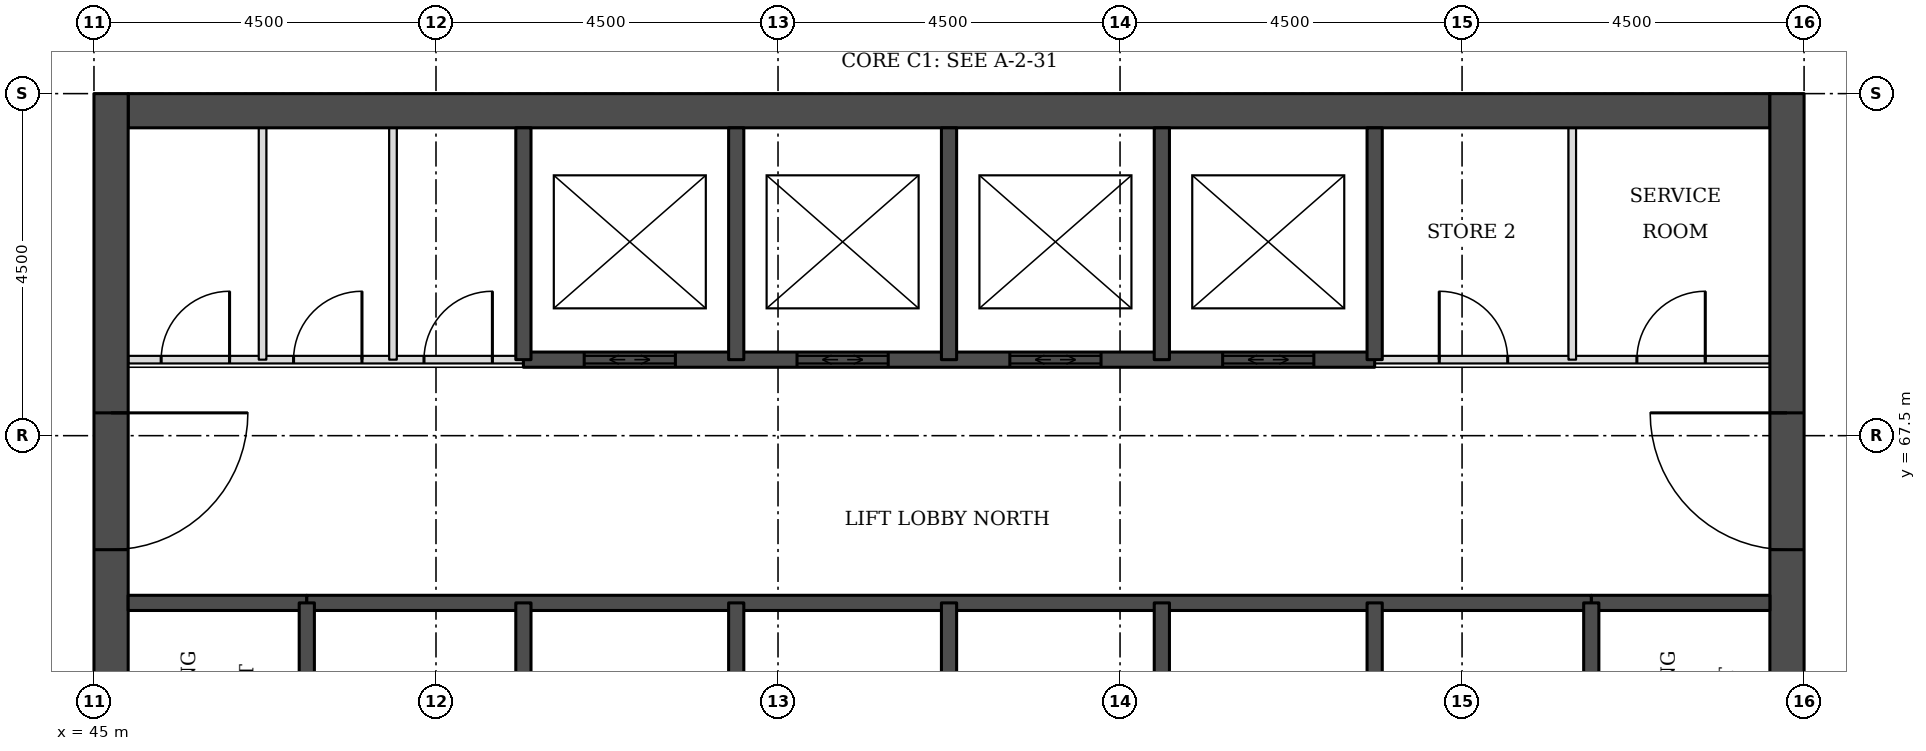
"""IFC4 building model, lengths in metres.
Left out: names, types, materials, properties, quantities, classifications, styles, units other than length and angle.
Written with IfcOpenShell. Run it as: python <this file> out.ifc"""

import sys

from ifc_helpers import new_model, si_unit, direction, frame, frame_2d, origin, place, context, subcontext, project, spatial, rectangle, extrude, element, fill, save


model = new_model("IFC4")
c1 = context("Model", 3, precision=1e-05, world=origin(), true_north=direction((0.0, 1.0)))
c2 = subcontext(c1, "Body", "Model", "MODEL_VIEW")
j1 = project(units=[si_unit("LENGTHUNIT", "METRE"), si_unit("PLANEANGLEUNIT", "RADIAN")], contexts=[c1])
p1 = place(None, origin())
s1 = spatial("IfcSite", under=j1, at=p1, CompositionType="ELEMENT")
p2 = place(p1, origin())
s2 = spatial("IfcBuilding", under=s1, at=p2, CompositionType="ELEMENT")
p3 = place(p2, frame((0.0, 0.0, 115.9)))
s3 = spatial("IfcBuildingStorey", under=s2, at=p3, CompositionType="ELEMENT", Elevation=115.9)
p4 = place(p3, frame((45.45, 71.775, 0.0), z_axis=(0.0, 0.0, 1.0), x_axis=(1.0, 0.0, 0.0)))
e1 = element("IfcWall", 1, at=p4, inside=s3, PredefinedType="SHEAR", context=c2, shape_type="SweptSolid", body=[
    extrude(rectangle(XDim=21.6, YDim=0.45, at=frame_2d((10.8, 0.0))), origin(), (0.0, 0.0, 1.0), 3.7),
])
p5 = place(p3, frame((45.225, 49.5, 0.0), z_axis=(0.0, 0.0, 1.0), x_axis=(0.0, 1.0, 0.0)))
e2 = element("IfcWall", 2, at=p5, inside=s3, PredefinedType="SHEAR", context=c2, shape_type="SweptSolid", body=[
    extrude(rectangle(XDim=22.5, YDim=0.45, at=frame_2d((11.25, 0.0))), origin(), (0.0, 0.0, 1.0), 3.7),
])
p6 = place(p5, frame((4.2, 0.0, 0.0)))
e3 = element("IfcOpeningElement", 3, at=p6, cuts=e2, PredefinedType="OPENING", context=c2, shape_type="SweptSolid", body=[
    extrude(rectangle(XDim=1.8, YDim=2.1, at=frame_2d((0.9, 1.05))), frame((0.0, 0.235, 0.0), z_axis=(0.0, -1.0, 0.0), x_axis=(1.0, 0.0, 0.0)), (0.0, 0.0, 1.0), 0.47),
])
p7 = place(p5, frame((6.9, 0.0, 0.0)))
e4 = element("IfcOpeningElement", 4, at=p7, cuts=e2, PredefinedType="OPENING", context=c2, shape_type="SweptSolid", body=[
    extrude(rectangle(XDim=1.1, YDim=2.1, at=frame_2d((0.55, 1.05))), frame((0.0, 0.235, 0.0), z_axis=(0.0, -1.0, 0.0), x_axis=(1.0, 0.0, 0.0)), (0.0, 0.0, 1.0), 0.47),
])
p8 = place(p5, frame((13.6, 0.0, 0.0)))
e5 = element("IfcOpeningElement", 5, at=p8, cuts=e2, PredefinedType="OPENING", context=c2, shape_type="SweptSolid", body=[
    extrude(rectangle(XDim=1.1, YDim=2.1, at=frame_2d((0.55, 1.05))), frame((0.0, 0.235, 0.0), z_axis=(0.0, -1.0, 0.0), x_axis=(1.0, 0.0, 0.0)), (0.0, 0.0, 1.0), 0.47),
])
p9 = place(p5, frame((16.5, 0.0, 0.0)))
e6 = element("IfcOpeningElement", 6, at=p9, cuts=e2, PredefinedType="OPENING", context=c2, shape_type="SweptSolid", body=[
    extrude(rectangle(XDim=1.8, YDim=2.1, at=frame_2d((0.9, 1.05))), frame((0.0, 0.235, 0.0), z_axis=(0.0, -1.0, 0.0), x_axis=(1.0, 0.0, 0.0)), (0.0, 0.0, 1.0), 0.47),
])
p10 = place(p3, frame((67.275, 49.5, 0.0), z_axis=(0.0, 0.0, 1.0), x_axis=(0.0, 1.0, 0.0)))
e7 = element("IfcWall", 7, at=p10, inside=s3, PredefinedType="SHEAR", context=c2, shape_type="SweptSolid", body=[
    extrude(rectangle(XDim=22.5, YDim=0.45, at=frame_2d((11.25, 0.0))), origin(), (0.0, 0.0, 1.0), 3.7),
])
p11 = place(p10, frame((4.2, 0.0, 0.0)))
e8 = element("IfcOpeningElement", 8, at=p11, cuts=e7, PredefinedType="OPENING", context=c2, shape_type="SweptSolid", body=[
    extrude(rectangle(XDim=1.8, YDim=2.1, at=frame_2d((0.9, 1.05))), frame((0.0, 0.235, 0.0), z_axis=(0.0, -1.0, 0.0), x_axis=(1.0, 0.0, 0.0)), (0.0, 0.0, 1.0), 0.47),
])
p12 = place(p10, frame((6.9, 0.0, 0.0)))
e9 = element("IfcOpeningElement", 9, at=p12, cuts=e7, PredefinedType="OPENING", context=c2, shape_type="SweptSolid", body=[
    extrude(rectangle(XDim=1.1, YDim=2.1, at=frame_2d((0.55, 1.05))), frame((0.0, 0.235, 0.0), z_axis=(0.0, -1.0, 0.0), x_axis=(1.0, 0.0, 0.0)), (0.0, 0.0, 1.0), 0.47),
])
p13 = place(p10, frame((13.6, 0.0, 0.0)))
e10 = element("IfcOpeningElement", 10, at=p13, cuts=e7, PredefinedType="OPENING", context=c2, shape_type="SweptSolid", body=[
    extrude(rectangle(XDim=1.1, YDim=2.1, at=frame_2d((0.55, 1.05))), frame((0.0, 0.235, 0.0), z_axis=(0.0, -1.0, 0.0), x_axis=(1.0, 0.0, 0.0)), (0.0, 0.0, 1.0), 0.47),
])
p14 = place(p10, frame((16.5, 0.0, 0.0)))
e11 = element("IfcOpeningElement", 11, at=p14, cuts=e7, PredefinedType="OPENING", context=c2, shape_type="SweptSolid", body=[
    extrude(rectangle(XDim=1.8, YDim=2.1, at=frame_2d((0.9, 1.05))), frame((0.0, 0.235, 0.0), z_axis=(0.0, -1.0, 0.0), x_axis=(1.0, 0.0, 0.0)), (0.0, 0.0, 1.0), 0.47),
])
for number, where, z_axis, x_axis in (
    (12, (45.45, 65.3, 0.0), (0.0, 0.0, 1.0), (1.0, 0.0, 0.0)),
    (13, (64.7, 65.3, 0.0), (0.0, 0.0, 1.0), (1.0, 0.0, 0.0)),
):
    element("IfcWall", number, at=place(p3, frame(where, z_axis=z_axis, x_axis=x_axis)), inside=s3, PredefinedType="SOLIDWALL", context=c2, shape_type="SweptSolid", body=[
        extrude(rectangle(XDim=2.35, YDim=0.2, at=frame_2d((1.175, 0.0))), origin(), (0.0, 0.0, 1.0), 3.55),
    ])
p15 = place(p3, frame((47.8, 65.3, 0.0), z_axis=(0.0, 0.0, 1.0), x_axis=(1.0, 0.0, 0.0)))
e14 = element("IfcWall", 14, at=p15, inside=s3, PredefinedType="SOLIDWALL", context=c2, shape_type="SweptSolid", body=[
    extrude(rectangle(XDim=16.9, YDim=0.2, at=frame_2d((8.45, 0.0))), origin(), (0.0, 0.0, 1.0), 3.55),
])
p16 = place(p3, frame((45.45, 68.5, 0.0), z_axis=(0.0, 0.0, 1.0), x_axis=(1.0, 0.0, 0.0)))
e15 = element("IfcWall", 15, at=p16, inside=s3, PredefinedType="PARTITIONING", context=c2, shape_type="SweptSolid", body=[
    extrude(rectangle(XDim=5.2, YDim=0.1, at=frame_2d((2.6, 0.0))), origin(), (0.0, 0.0, 1.0), 3.55),
])
p17 = place(p16, frame((0.434, 0.0, 0.0)))
e16 = element("IfcOpeningElement", 16, at=p17, cuts=e15, PredefinedType="OPENING", context=c2, shape_type="SweptSolid", body=[
    extrude(rectangle(XDim=0.9, YDim=2.1, at=frame_2d((0.45, 1.05))), frame((0.0, 0.06, 0.0), z_axis=(0.0, -1.0, 0.0), x_axis=(1.0, 0.0, 0.0)), (0.0, 0.0, 1.0), 0.12),
])
p18 = place(p16, frame((2.176, 0.0, 0.0)))
e17 = element("IfcOpeningElement", 17, at=p18, cuts=e15, PredefinedType="OPENING", context=c2, shape_type="SweptSolid", body=[
    extrude(rectangle(XDim=0.9, YDim=2.1, at=frame_2d((0.45, 1.05))), frame((0.0, 0.06, 0.0), z_axis=(0.0, -1.0, 0.0), x_axis=(1.0, 0.0, 0.0)), (0.0, 0.0, 1.0), 0.12),
])
p19 = place(p16, frame((3.892, 0.0, 0.0)))
e18 = element("IfcOpeningElement", 18, at=p19, cuts=e15, PredefinedType="OPENING", context=c2, shape_type="SweptSolid", body=[
    extrude(rectangle(XDim=0.9, YDim=2.1, at=frame_2d((0.45, 1.05))), frame((0.0, 0.06, 0.0), z_axis=(0.0, -1.0, 0.0), x_axis=(1.0, 0.0, 0.0)), (0.0, 0.0, 1.0), 0.12),
])
p20 = place(p3, frame((61.85, 68.5, 0.0), z_axis=(0.0, 0.0, 1.0), x_axis=(1.0, 0.0, 0.0)))
e19 = element("IfcWall", 19, at=p20, inside=s3, PredefinedType="PARTITIONING", context=c2, shape_type="SweptSolid", body=[
    extrude(rectangle(XDim=5.2, YDim=0.1, at=frame_2d((2.6, 0.0))), origin(), (0.0, 0.0, 1.0), 3.55),
])
p21 = place(p20, frame((3.45, 0.0, 0.0)))
e20 = element("IfcOpeningElement", 20, at=p21, cuts=e19, PredefinedType="OPENING", context=c2, shape_type="SweptSolid", body=[
    extrude(rectangle(XDim=0.9, YDim=2.1, at=frame_2d((0.45, 1.05))), frame((0.0, 0.06, 0.0), z_axis=(0.0, -1.0, 0.0), x_axis=(1.0, 0.0, 0.0)), (0.0, 0.0, 1.0), 0.12),
])
p22 = place(p20, frame((0.85, 0.0, 0.0)))
e21 = element("IfcOpeningElement", 21, at=p22, cuts=e19, PredefinedType="OPENING", context=c2, shape_type="SweptSolid", body=[
    extrude(rectangle(XDim=0.9, YDim=2.1, at=frame_2d((0.45, 1.05))), frame((0.0, 0.06, 0.0), z_axis=(0.0, -1.0, 0.0), x_axis=(1.0, 0.0, 0.0)), (0.0, 0.0, 1.0), 0.12),
])
p23 = place(p3, frame((50.65, 68.5, 0.0), z_axis=(0.0, 0.0, 1.0), x_axis=(1.0, 0.0, 0.0)))
e22 = element("IfcWall", 22, at=p23, inside=s3, PredefinedType="SOLIDWALL", context=c2, shape_type="SweptSolid", body=[
    extrude(rectangle(XDim=11.2, YDim=0.2, at=frame_2d((5.6, 0.0))), origin(), (0.0, 0.0, 1.0), 3.55),
])
p24 = place(p23, frame((0.8, 0.0, 0.0)))
e23 = element("IfcOpeningElement", 23, at=p24, cuts=e22, PredefinedType="OPENING", context=c2, shape_type="SweptSolid", body=[
    extrude(rectangle(XDim=1.2, YDim=2.1, at=frame_2d((0.6, 1.05))), frame((0.0, 0.11, 0.0), z_axis=(0.0, -1.0, 0.0), x_axis=(1.0, 0.0, 0.0)), (0.0, 0.0, 1.0), 0.22),
])
p25 = place(p23, frame((3.6, 0.0, 0.0)))
e24 = element("IfcOpeningElement", 24, at=p25, cuts=e22, PredefinedType="OPENING", context=c2, shape_type="SweptSolid", body=[
    extrude(rectangle(XDim=1.2, YDim=2.1, at=frame_2d((0.6, 1.05))), frame((0.0, 0.11, 0.0), z_axis=(0.0, -1.0, 0.0), x_axis=(1.0, 0.0, 0.0)), (0.0, 0.0, 1.0), 0.22),
])
p26 = place(p23, frame((6.4, 0.0, 0.0)))
e25 = element("IfcOpeningElement", 25, at=p26, cuts=e22, PredefinedType="OPENING", context=c2, shape_type="SweptSolid", body=[
    extrude(rectangle(XDim=1.2, YDim=2.1, at=frame_2d((0.6, 1.05))), frame((0.0, 0.11, 0.0), z_axis=(0.0, -1.0, 0.0), x_axis=(1.0, 0.0, 0.0)), (0.0, 0.0, 1.0), 0.22),
])
p27 = place(p23, frame((9.2, 0.0, 0.0)))
e26 = element("IfcOpeningElement", 26, at=p27, cuts=e22, PredefinedType="OPENING", context=c2, shape_type="SweptSolid", body=[
    extrude(rectangle(XDim=1.2, YDim=2.1, at=frame_2d((0.6, 1.05))), frame((0.0, 0.11, 0.0), z_axis=(0.0, -1.0, 0.0), x_axis=(1.0, 0.0, 0.0)), (0.0, 0.0, 1.0), 0.22),
])
p28 = place(p3, frame((47.218, 68.5, 0.0), z_axis=(0.0, 0.0, 1.0), x_axis=(0.0, 1.0, 0.0)))
e27 = element("IfcWall", 27, at=p28, inside=s3, PredefinedType="PARTITIONING", context=c2, shape_type="SweptSolid", body=[
    extrude(rectangle(XDim=3.05, YDim=0.1, at=frame_2d((1.525, 0.0))), origin(), (0.0, 0.0, 1.0), 3.55),
])
p29 = place(p3, frame((47.8, 62.0, 0.0), z_axis=(0.0, 0.0, 1.0), x_axis=(0.0, 1.0, 0.0)))
e28 = element("IfcWall", 28, at=p29, inside=s3, PredefinedType="SOLIDWALL", context=c2, shape_type="SweptSolid", body=[
    extrude(rectangle(XDim=3.3, YDim=0.2, at=frame_2d((1.65, 0.0))), origin(), (0.0, 0.0, 1.0), 3.55),
])
p30 = place(p29, frame((1.1, 0.0, 0.0)))
e29 = element("IfcOpeningElement", 29, at=p30, cuts=e28, PredefinedType="OPENING", context=c2, shape_type="SweptSolid", body=[
    extrude(rectangle(XDim=1.1, YDim=2.1, at=frame_2d((0.55, 1.05))), frame((0.0, 0.11, 0.0), z_axis=(0.0, -1.0, 0.0), x_axis=(1.0, 0.0, 0.0)), (0.0, 0.0, 1.0), 0.22),
])
p31 = place(p3, frame((48.934, 68.5, 0.0), z_axis=(0.0, 0.0, 1.0), x_axis=(0.0, 1.0, 0.0)))
e30 = element("IfcWall", 30, at=p31, inside=s3, PredefinedType="PARTITIONING", context=c2, shape_type="SweptSolid", body=[
    extrude(rectangle(XDim=3.05, YDim=0.1, at=frame_2d((1.525, 0.0))), origin(), (0.0, 0.0, 1.0), 3.55),
])
p32 = place(p3, frame((50.65, 62.0, 0.0), z_axis=(0.0, 0.0, 1.0), x_axis=(0.0, 1.0, 0.0)))
e31 = element("IfcWall", 31, at=p32, inside=s3, PredefinedType="SOLIDWALL", context=c2, shape_type="SweptSolid", body=[
    extrude(rectangle(XDim=3.3, YDim=0.2, at=frame_2d((1.65, 0.0))), origin(), (0.0, 0.0, 1.0), 3.55),
])
p33 = place(p3, frame((50.65, 68.5, 0.0), z_axis=(0.0, 0.0, 1.0), x_axis=(0.0, 1.0, 0.0)))
e32 = element("IfcWall", 32, at=p33, inside=s3, PredefinedType="SOLIDWALL", context=c2, shape_type="SweptSolid", body=[
    extrude(rectangle(XDim=3.05, YDim=0.2, at=frame_2d((1.525, 0.0))), origin(), (0.0, 0.0, 1.0), 3.55),
])
p34 = place(p3, frame((53.45, 62.5, 0.0), z_axis=(0.0, 0.0, 1.0), x_axis=(0.0, 1.0, 0.0)))
e33 = element("IfcWall", 33, at=p34, inside=s3, PredefinedType="SOLIDWALL", context=c2, shape_type="SweptSolid", body=[
    extrude(rectangle(XDim=2.8, YDim=0.2, at=frame_2d((1.4, 0.0))), origin(), (0.0, 0.0, 1.0), 3.55),
])
p35 = place(p3, frame((53.45, 68.5, 0.0), z_axis=(0.0, 0.0, 1.0), x_axis=(0.0, 1.0, 0.0)))
e34 = element("IfcWall", 34, at=p35, inside=s3, PredefinedType="SOLIDWALL", context=c2, shape_type="SweptSolid", body=[
    extrude(rectangle(XDim=3.05, YDim=0.2, at=frame_2d((1.525, 0.0))), origin(), (0.0, 0.0, 1.0), 3.55),
])
p36 = place(p3, frame((56.25, 62.5, 0.0), z_axis=(0.0, 0.0, 1.0), x_axis=(0.0, 1.0, 0.0)))
e35 = element("IfcWall", 35, at=p36, inside=s3, PredefinedType="SOLIDWALL", context=c2, shape_type="SweptSolid", body=[
    extrude(rectangle(XDim=2.8, YDim=0.2, at=frame_2d((1.4, 0.0))), origin(), (0.0, 0.0, 1.0), 3.55),
])
p37 = place(p3, frame((56.25, 68.5, 0.0), z_axis=(0.0, 0.0, 1.0), x_axis=(0.0, 1.0, 0.0)))
e36 = element("IfcWall", 36, at=p37, inside=s3, PredefinedType="SOLIDWALL", context=c2, shape_type="SweptSolid", body=[
    extrude(rectangle(XDim=3.05, YDim=0.2, at=frame_2d((1.525, 0.0))), origin(), (0.0, 0.0, 1.0), 3.55),
])
p38 = place(p3, frame((59.05, 62.5, 0.0), z_axis=(0.0, 0.0, 1.0), x_axis=(0.0, 1.0, 0.0)))
e37 = element("IfcWall", 37, at=p38, inside=s3, PredefinedType="SOLIDWALL", context=c2, shape_type="SweptSolid", body=[
    extrude(rectangle(XDim=2.8, YDim=0.2, at=frame_2d((1.4, 0.0))), origin(), (0.0, 0.0, 1.0), 3.55),
])
p39 = place(p3, frame((59.05, 68.5, 0.0), z_axis=(0.0, 0.0, 1.0), x_axis=(0.0, 1.0, 0.0)))
e38 = element("IfcWall", 38, at=p39, inside=s3, PredefinedType="SOLIDWALL", context=c2, shape_type="SweptSolid", body=[
    extrude(rectangle(XDim=3.05, YDim=0.2, at=frame_2d((1.525, 0.0))), origin(), (0.0, 0.0, 1.0), 3.55),
])
p40 = place(p3, frame((61.85, 62.0, 0.0), z_axis=(0.0, 0.0, 1.0), x_axis=(0.0, 1.0, 0.0)))
e39 = element("IfcWall", 39, at=p40, inside=s3, PredefinedType="SOLIDWALL", context=c2, shape_type="SweptSolid", body=[
    extrude(rectangle(XDim=3.3, YDim=0.2, at=frame_2d((1.65, 0.0))), origin(), (0.0, 0.0, 1.0), 3.55),
])
p41 = place(p3, frame((61.85, 68.5, 0.0), z_axis=(0.0, 0.0, 1.0), x_axis=(0.0, 1.0, 0.0)))
e40 = element("IfcWall", 40, at=p41, inside=s3, PredefinedType="SOLIDWALL", context=c2, shape_type="SweptSolid", body=[
    extrude(rectangle(XDim=3.05, YDim=0.2, at=frame_2d((1.525, 0.0))), origin(), (0.0, 0.0, 1.0), 3.55),
])
p42 = place(p3, frame((64.45, 68.5, 0.0), z_axis=(0.0, 0.0, 1.0), x_axis=(0.0, 1.0, 0.0)))
e41 = element("IfcWall", 41, at=p42, inside=s3, PredefinedType="PARTITIONING", context=c2, shape_type="SweptSolid", body=[
    extrude(rectangle(XDim=3.05, YDim=0.1, at=frame_2d((1.525, 0.0))), origin(), (0.0, 0.0, 1.0), 3.55),
])
p43 = place(p3, frame((64.7, 62.0, 0.0), z_axis=(0.0, 0.0, 1.0), x_axis=(0.0, 1.0, 0.0)))
e42 = element("IfcWall", 42, at=p43, inside=s3, PredefinedType="SOLIDWALL", context=c2, shape_type="SweptSolid", body=[
    extrude(rectangle(XDim=3.3, YDim=0.2, at=frame_2d((1.65, 0.0))), origin(), (0.0, 0.0, 1.0), 3.55),
])
p44 = place(p43, frame((1.1, 0.0, 0.0)))
e43 = element("IfcOpeningElement", 43, at=p44, cuts=e42, PredefinedType="OPENING", context=c2, shape_type="SweptSolid", body=[
    extrude(rectangle(XDim=1.1, YDim=2.1, at=frame_2d((0.55, 1.05))), frame((0.0, 0.11, 0.0), z_axis=(0.0, -1.0, 0.0), x_axis=(1.0, 0.0, 0.0)), (0.0, 0.0, 1.0), 0.22),
])
p45 = place(p24, origin())
e44 = element("IfcDoor", 44, at=p45, inside=s3, OperationType="DOUBLE_DOOR_SLIDING", PredefinedType="DOOR", context=c2, shape_type="SweptSolid", body=[
    extrude(rectangle(XDim=1.2, YDim=2.1, at=frame_2d((0.6, 1.05))), frame((0.0, 0.025, 0.0), z_axis=(0.0, -1.0, 0.0), x_axis=(1.0, 0.0, 0.0)), (0.0, 0.0, 1.0), 0.05),
])
fill(e23, e44)
p46 = place(p25, origin())
e45 = element("IfcDoor", 45, at=p46, inside=s3, OperationType="DOUBLE_DOOR_SLIDING", PredefinedType="DOOR", context=c2, shape_type="SweptSolid", body=[
    extrude(rectangle(XDim=1.2, YDim=2.1, at=frame_2d((0.6, 1.05))), frame((0.0, 0.025, 0.0), z_axis=(0.0, -1.0, 0.0), x_axis=(1.0, 0.0, 0.0)), (0.0, 0.0, 1.0), 0.05),
])
fill(e24, e45)
p47 = place(p26, origin())
e46 = element("IfcDoor", 46, at=p47, inside=s3, OperationType="DOUBLE_DOOR_SLIDING", PredefinedType="DOOR", context=c2, shape_type="SweptSolid", body=[
    extrude(rectangle(XDim=1.2, YDim=2.1, at=frame_2d((0.6, 1.05))), frame((0.0, 0.025, 0.0), z_axis=(0.0, -1.0, 0.0), x_axis=(1.0, 0.0, 0.0)), (0.0, 0.0, 1.0), 0.05),
])
fill(e25, e46)
p48 = place(p27, origin())
e47 = element("IfcDoor", 47, at=p48, inside=s3, OperationType="DOUBLE_DOOR_SLIDING", PredefinedType="DOOR", context=c2, shape_type="SweptSolid", body=[
    extrude(rectangle(XDim=1.2, YDim=2.1, at=frame_2d((0.6, 1.05))), frame((0.0, 0.025, 0.0), z_axis=(0.0, -1.0, 0.0), x_axis=(1.0, 0.0, 0.0)), (0.0, 0.0, 1.0), 0.05),
])
fill(e26, e47)
p49 = place(p9, frame((1.8, 0.0, 0.0), z_axis=(0.0, 0.0, 1.0), x_axis=(-1.0, 0.0, 0.0)))
e48 = element("IfcDoor", 48, at=p49, inside=s3, OperationType="SINGLE_SWING_LEFT", PredefinedType="DOOR", context=c2, shape_type="SweptSolid", body=[
    extrude(rectangle(XDim=1.8, YDim=2.1, at=frame_2d((0.9, 1.05))), frame((0.0, 0.025, 0.0), z_axis=(0.0, -1.0, 0.0), x_axis=(1.0, 0.0, 0.0)), (0.0, 0.0, 1.0), 0.05),
])
fill(e6, e48)
p50 = place(p14, origin())
e49 = element("IfcDoor", 49, at=p50, inside=s3, OperationType="SINGLE_SWING_RIGHT", PredefinedType="DOOR", context=c2, shape_type="SweptSolid", body=[
    extrude(rectangle(XDim=1.8, YDim=2.1, at=frame_2d((0.9, 1.05))), frame((0.0, 0.025, 0.0), z_axis=(0.0, -1.0, 0.0), x_axis=(1.0, 0.0, 0.0)), (0.0, 0.0, 1.0), 0.05),
])
fill(e11, e49)
p51 = place(p21, origin())
e50 = element("IfcDoor", 50, at=p51, inside=s3, OperationType="SINGLE_SWING_RIGHT", PredefinedType="DOOR", context=c2, shape_type="SweptSolid", body=[
    extrude(rectangle(XDim=0.9, YDim=2.1, at=frame_2d((0.45, 1.05))), frame((0.0, 0.025, 0.0), z_axis=(0.0, -1.0, 0.0), x_axis=(1.0, 0.0, 0.0)), (0.0, 0.0, 1.0), 0.05),
])
fill(e20, e50)
p52 = place(p22, origin())
e51 = element("IfcDoor", 51, at=p52, inside=s3, OperationType="SINGLE_SWING_LEFT", PredefinedType="DOOR", context=c2, shape_type="SweptSolid", body=[
    extrude(rectangle(XDim=0.9, YDim=2.1, at=frame_2d((0.45, 1.05))), frame((0.0, 0.025, 0.0), z_axis=(0.0, -1.0, 0.0), x_axis=(1.0, 0.0, 0.0)), (0.0, 0.0, 1.0), 0.05),
])
fill(e21, e51)
p53 = place(p17, origin())
e52 = element("IfcDoor", 52, at=p53, inside=s3, OperationType="SINGLE_SWING_RIGHT", PredefinedType="DOOR", context=c2, shape_type="SweptSolid", body=[
    extrude(rectangle(XDim=0.9, YDim=2.1, at=frame_2d((0.45, 1.05))), frame((0.0, 0.025, 0.0), z_axis=(0.0, -1.0, 0.0), x_axis=(1.0, 0.0, 0.0)), (0.0, 0.0, 1.0), 0.05),
])
fill(e16, e52)
p54 = place(p18, origin())
e53 = element("IfcDoor", 53, at=p54, inside=s3, OperationType="SINGLE_SWING_RIGHT", PredefinedType="DOOR", context=c2, shape_type="SweptSolid", body=[
    extrude(rectangle(XDim=0.9, YDim=2.1, at=frame_2d((0.45, 1.05))), frame((0.0, 0.025, 0.0), z_axis=(0.0, -1.0, 0.0), x_axis=(1.0, 0.0, 0.0)), (0.0, 0.0, 1.0), 0.05),
])
fill(e17, e53)
p55 = place(p19, origin())
e54 = element("IfcDoor", 54, at=p55, inside=s3, OperationType="SINGLE_SWING_RIGHT", PredefinedType="DOOR", context=c2, shape_type="SweptSolid", body=[
    extrude(rectangle(XDim=0.9, YDim=2.1, at=frame_2d((0.45, 1.05))), frame((0.0, 0.025, 0.0), z_axis=(0.0, -1.0, 0.0), x_axis=(1.0, 0.0, 0.0)), (0.0, 0.0, 1.0), 0.05),
])
fill(e18, e54)
save(model, sys.argv[1])
